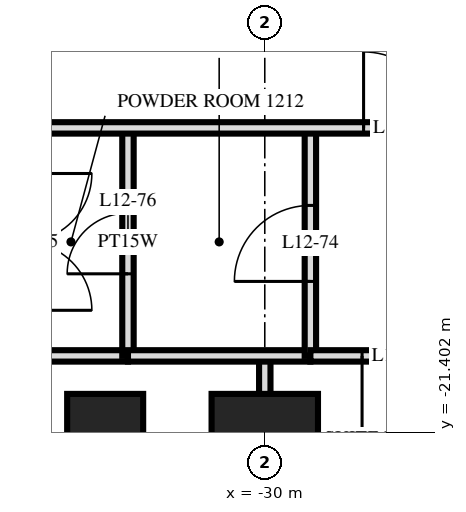
"""IFC4 building model, lengths in metres.
Left out: names, types, materials, properties, quantities, classifications, styles, units other than length and angle.
Written with IfcOpenShell. Run it as: python <this file> out.ifc"""

import sys

from ifc_helpers import new_model, si_unit, direction, frame, frame_2d, origin, origin_2d, place, context, subcontext, project, spatial, rectangle, extrude, element, fill, save


model = new_model("IFC4")
c1 = context("Model", 3, precision=1e-05, world=origin(), true_north=direction((0.0, 1.0)))
c2 = subcontext(c1, "Body", "Model", "MODEL_VIEW")
j1 = project(units=[si_unit("LENGTHUNIT", "METRE"), si_unit("PLANEANGLEUNIT", "RADIAN")], contexts=[c1])
p1 = place(None, origin())
s1 = spatial("IfcSite", under=j1, at=p1, CompositionType="ELEMENT")
p2 = place(p1, origin())
s2 = spatial("IfcBuilding", under=s1, at=p2, CompositionType="ELEMENT")
p3 = place(p2, frame((0.0, 0.0, 52.8)))
s3 = spatial("IfcBuildingStorey", under=s2, at=p3, CompositionType="ELEMENT", Elevation=52.8)
p4 = place(p3, frame((-32.1, -21.6, 0.0), z_axis=(0.0, 0.0, 1.0), x_axis=(0.0, 1.0, 0.0)))
e1 = element("IfcColumn", 1, at=p4, inside=s3, PredefinedType="COLUMN", context=c2, shape_type="SweptSolid", body=[
    extrude(rectangle(XDim=1.4, YDim=1.0, at=origin_2d()), origin(), (0.0, 0.0, 1.0), 3.6),
])
p5 = place(p3, frame((-30.0, -21.6, 0.0), z_axis=(0.0, 0.0, 1.0), x_axis=(1.0, 0.0, 0.0)))
e2 = element("IfcColumn", 2, at=p5, inside=s3, PredefinedType="COLUMN", context=c2, shape_type="SweptSolid", body=[
    extrude(rectangle(XDim=1.4, YDim=1.4, at=origin_2d()), origin(), (0.0, 0.0, 1.0), 3.6),
])
p6 = place(p3, frame((-29.4, -20.4, 0.0), z_axis=(0.0, 0.0, 1.0), x_axis=(0.0, 1.0, 0.0)))
e3 = element("IfcWall", 3, at=p6, inside=s3, PredefinedType="PARTITIONING", context=c2, shape_type="SweptSolid", body=[
    extrude(rectangle(XDim=3.0, YDim=0.15, at=frame_2d((1.5, 0.0))), origin(), (0.0, 0.0, 1.0), 3.32),
])
p7 = place(p6, frame((0.98, 0.0, 0.0)))
e4 = element("IfcOpeningElement", 4, at=p7, cuts=e3, PredefinedType="OPENING", context=c2, shape_type="SweptSolid", body=[
    extrude(rectangle(XDim=1.0, YDim=2.1, at=frame_2d((0.5, 1.05))), frame((0.0, 0.085, 0.0), z_axis=(0.0, -1.0, 0.0), x_axis=(1.0, 0.0, 0.0)), (0.0, 0.0, 1.0), 0.17),
])
p8 = place(p3, frame((-30.0, -28.978, 0.0), z_axis=(0.0, 0.0, 1.0), x_axis=(0.0, 1.0, 0.0)))
e5 = element("IfcWall", 5, at=p8, inside=s3, PredefinedType="PARTITIONING", context=c2, shape_type="SweptSolid", body=[
    extrude(rectangle(XDim=8.578, YDim=0.15, at=frame_2d((4.289, 0.0))), origin(), (0.0, 0.0, 1.0), 3.32),
])
p9 = place(p8, frame((3.737, 0.0, 0.0)))
e6 = element("IfcOpeningElement", 6, at=p9, cuts=e5, PredefinedType="OPENING", context=c2, shape_type="SweptSolid", body=[
    extrude(rectangle(XDim=0.9, YDim=2.1, at=frame_2d((0.45, 1.05))), frame((0.0, 0.085, 0.0), z_axis=(0.0, -1.0, 0.0), x_axis=(1.0, 0.0, 0.0)), (0.0, 0.0, 1.0), 0.17),
])
p10 = place(p3, frame((-31.8, -20.4, 0.0), z_axis=(0.0, 0.0, 1.0), x_axis=(0.0, 1.0, 0.0)))
e7 = element("IfcWall", 7, at=p10, inside=s3, PredefinedType="PLUMBINGWALL", context=c2, shape_type="SweptSolid", body=[
    extrude(rectangle(XDim=3.0, YDim=0.15, at=frame_2d((1.5, 0.0))), origin(), (0.0, 0.0, 1.0), 3.32),
])
p11 = place(p10, frame((1.08, 0.0, 0.0)))
e8 = element("IfcOpeningElement", 8, at=p11, cuts=e7, PredefinedType="OPENING", context=c2, shape_type="SweptSolid", body=[
    extrude(rectangle(XDim=0.8, YDim=2.1, at=frame_2d((0.4, 1.05))), frame((0.0, 0.085, 0.0), z_axis=(0.0, -1.0, 0.0), x_axis=(1.0, 0.0, 0.0)), (0.0, 0.0, 1.0), 0.17),
])
p12 = place(p3, frame((-29.4, -20.4, 0.0), z_axis=(0.0, 0.0, 1.0), x_axis=(1.0, 0.0, 0.0)))
e9 = element("IfcWall", 9, at=p12, inside=s3, PredefinedType="PARTITIONING", context=c2, shape_type="SweptSolid", body=[
    extrude(rectangle(XDim=2.4, YDim=0.15, at=frame_2d((1.2, 0.0))), origin(), (0.0, 0.0, 1.0), 3.32),
])
p13 = place(p12, frame((0.68, 0.0, 0.0)))
e10 = element("IfcOpeningElement", 10, at=p13, cuts=e9, PredefinedType="OPENING", context=c2, shape_type="SweptSolid", body=[
    extrude(rectangle(XDim=1.0, YDim=2.1, at=frame_2d((0.5, 1.05))), frame((0.0, 0.085, 0.0), z_axis=(0.0, -1.0, 0.0), x_axis=(1.0, 0.0, 0.0)), (0.0, 0.0, 1.0), 0.17),
])
p14 = place(p3, frame((-31.8, -20.4, 0.0), z_axis=(0.0, 0.0, 1.0), x_axis=(1.0, 0.0, 0.0)))
e11 = element("IfcWall", 11, at=p14, inside=s3, PredefinedType="PARTITIONING", context=c2, shape_type="SweptSolid", body=[
    extrude(rectangle(XDim=2.4, YDim=0.15, at=frame_2d((1.2, 0.0))), origin(), (0.0, 0.0, 1.0), 3.32),
])
p15 = place(p3, frame((-33.12, -20.4, 0.0), z_axis=(0.0, 0.0, 1.0), x_axis=(1.0, 0.0, 0.0)))
e12 = element("IfcWall", 12, at=p15, inside=s3, PredefinedType="PLUMBINGWALL", context=c2, shape_type="SweptSolid", body=[
    extrude(rectangle(XDim=1.32, YDim=0.15, at=frame_2d((0.66, 0.0))), origin(), (0.0, 0.0, 1.0), 3.32),
])
p16 = place(p3, frame((-33.12, -17.4, 0.0), z_axis=(0.0, 0.0, 1.0), x_axis=(1.0, 0.0, 0.0)))
e13 = element("IfcWall", 13, at=p16, inside=s3, PredefinedType="PARTITIONING", context=c2, shape_type="SweptSolid", body=[
    extrude(rectangle(XDim=66.24, YDim=0.15, at=frame_2d((33.12, 0.0))), origin(), (0.0, 0.0, 1.0), 3.32),
])
p17 = place(p16, frame((9.27, 0.0, 0.0)))
e14 = element("IfcOpeningElement", 14, at=p17, cuts=e13, PredefinedType="OPENING", context=c2, shape_type="SweptSolid", body=[
    extrude(rectangle(XDim=1.0, YDim=2.1, at=frame_2d((0.5, 1.05))), frame((0.0, 0.085, 0.0), z_axis=(0.0, -1.0, 0.0), x_axis=(1.0, 0.0, 0.0)), (0.0, 0.0, 1.0), 0.17),
])
p18 = place(p16, frame((13.97, 0.0, 0.0)))
e15 = element("IfcOpeningElement", 15, at=p18, cuts=e13, PredefinedType="OPENING", context=c2, shape_type="SweptSolid", body=[
    extrude(rectangle(XDim=1.0, YDim=2.1, at=frame_2d((0.5, 1.05))), frame((0.0, 0.085, 0.0), z_axis=(0.0, -1.0, 0.0), x_axis=(1.0, 0.0, 0.0)), (0.0, 0.0, 1.0), 0.17),
])
p19 = place(p16, frame((15.27, 0.0, 0.0)))
e16 = element("IfcOpeningElement", 16, at=p19, cuts=e13, PredefinedType="OPENING", context=c2, shape_type="SweptSolid", body=[
    extrude(rectangle(XDim=1.0, YDim=2.1, at=frame_2d((0.5, 1.05))), frame((0.0, 0.085, 0.0), z_axis=(0.0, -1.0, 0.0), x_axis=(1.0, 0.0, 0.0)), (0.0, 0.0, 1.0), 0.17),
])
p20 = place(p16, frame((19.97, 0.0, 0.0)))
e17 = element("IfcOpeningElement", 17, at=p20, cuts=e13, PredefinedType="OPENING", context=c2, shape_type="SweptSolid", body=[
    extrude(rectangle(XDim=1.0, YDim=2.1, at=frame_2d((0.5, 1.05))), frame((0.0, 0.085, 0.0), z_axis=(0.0, -1.0, 0.0), x_axis=(1.0, 0.0, 0.0)), (0.0, 0.0, 1.0), 0.17),
])
p21 = place(p16, frame((22.27, 0.0, 0.0)))
e18 = element("IfcOpeningElement", 18, at=p21, cuts=e13, PredefinedType="OPENING", context=c2, shape_type="SweptSolid", body=[
    extrude(rectangle(XDim=1.0, YDim=2.1, at=frame_2d((0.5, 1.05))), frame((0.0, 0.085, 0.0), z_axis=(0.0, -1.0, 0.0), x_axis=(1.0, 0.0, 0.0)), (0.0, 0.0, 1.0), 0.17),
])
p22 = place(p16, frame((28.97, 0.0, 0.0)))
e19 = element("IfcOpeningElement", 19, at=p22, cuts=e13, PredefinedType="OPENING", context=c2, shape_type="SweptSolid", body=[
    extrude(rectangle(XDim=1.0, YDim=2.1, at=frame_2d((0.5, 1.05))), frame((0.0, 0.085, 0.0), z_axis=(0.0, -1.0, 0.0), x_axis=(1.0, 0.0, 0.0)), (0.0, 0.0, 1.0), 0.17),
])
p23 = place(p16, frame((30.27, 0.0, 0.0)))
e20 = element("IfcOpeningElement", 20, at=p23, cuts=e13, PredefinedType="OPENING", context=c2, shape_type="SweptSolid", body=[
    extrude(rectangle(XDim=1.0, YDim=2.1, at=frame_2d((0.5, 1.05))), frame((0.0, 0.085, 0.0), z_axis=(0.0, -1.0, 0.0), x_axis=(1.0, 0.0, 0.0)), (0.0, 0.0, 1.0), 0.17),
])
p24 = place(p16, frame((34.97, 0.0, 0.0)))
e21 = element("IfcOpeningElement", 21, at=p24, cuts=e13, PredefinedType="OPENING", context=c2, shape_type="SweptSolid", body=[
    extrude(rectangle(XDim=1.0, YDim=2.1, at=frame_2d((0.5, 1.05))), frame((0.0, 0.085, 0.0), z_axis=(0.0, -1.0, 0.0), x_axis=(1.0, 0.0, 0.0)), (0.0, 0.0, 1.0), 0.17),
])
p25 = place(p16, frame((36.27, 0.0, 0.0)))
e22 = element("IfcOpeningElement", 22, at=p25, cuts=e13, PredefinedType="OPENING", context=c2, shape_type="SweptSolid", body=[
    extrude(rectangle(XDim=1.0, YDim=2.1, at=frame_2d((0.5, 1.05))), frame((0.0, 0.085, 0.0), z_axis=(0.0, -1.0, 0.0), x_axis=(1.0, 0.0, 0.0)), (0.0, 0.0, 1.0), 0.17),
])
p26 = place(p16, frame((39.82, 0.0, 0.0)))
e23 = element("IfcOpeningElement", 23, at=p26, cuts=e13, PredefinedType="OPENING", context=c2, shape_type="SweptSolid", body=[
    extrude(rectangle(XDim=1.0, YDim=2.1, at=frame_2d((0.5, 1.05))), frame((0.0, 0.085, 0.0), z_axis=(0.0, -1.0, 0.0), x_axis=(1.0, 0.0, 0.0)), (0.0, 0.0, 1.0), 0.17),
])
p27 = place(p16, frame((51.27, 0.0, 0.0)))
e24 = element("IfcOpeningElement", 24, at=p27, cuts=e13, PredefinedType="OPENING", context=c2, shape_type="SweptSolid", body=[
    extrude(rectangle(XDim=1.0, YDim=2.1, at=frame_2d((0.5, 1.05))), frame((0.0, 0.085, 0.0), z_axis=(0.0, -1.0, 0.0), x_axis=(1.0, 0.0, 0.0)), (0.0, 0.0, 1.0), 0.17),
])
p28 = place(p16, frame((4.42, 0.0, 0.0)))
e25 = element("IfcOpeningElement", 25, at=p28, cuts=e13, PredefinedType="OPENING", context=c2, shape_type="SweptSolid", body=[
    extrude(rectangle(XDim=1.0, YDim=2.1, at=frame_2d((0.5, 1.05))), frame((0.0, 0.085, 0.0), z_axis=(0.0, -1.0, 0.0), x_axis=(1.0, 0.0, 0.0)), (0.0, 0.0, 1.0), 0.17),
])
p29 = place(p16, frame((54.82, 0.0, 0.0)))
e26 = element("IfcOpeningElement", 26, at=p29, cuts=e13, PredefinedType="OPENING", context=c2, shape_type="SweptSolid", body=[
    extrude(rectangle(XDim=1.0, YDim=2.1, at=frame_2d((0.5, 1.05))), frame((0.0, 0.085, 0.0), z_axis=(0.0, -1.0, 0.0), x_axis=(1.0, 0.0, 0.0)), (0.0, 0.0, 1.0), 0.17),
])
p30 = place(p28, origin())
e27 = element("IfcDoor", 27, at=p30, inside=s3, OperationType="SINGLE_SWING_RIGHT", PredefinedType="DOOR", context=c2, shape_type="SweptSolid", body=[
    extrude(rectangle(XDim=1.0, YDim=2.1, at=frame_2d((0.5, 1.05))), frame((0.0, 0.025, 0.0), z_axis=(0.0, -1.0, 0.0), x_axis=(1.0, 0.0, 0.0)), (0.0, 0.0, 1.0), 0.05),
])
fill(e25, e27)
p31 = place(p7, origin())
e28 = element("IfcDoor", 28, at=p31, inside=s3, OperationType="SINGLE_SWING_RIGHT", PredefinedType="DOOR", context=c2, shape_type="SweptSolid", body=[
    extrude(rectangle(XDim=1.0, YDim=2.1, at=frame_2d((0.5, 1.05))), frame((0.0, 0.025, 0.0), z_axis=(0.0, -1.0, 0.0), x_axis=(1.0, 0.0, 0.0)), (0.0, 0.0, 1.0), 0.05),
])
fill(e4, e28)
p32 = place(p13, frame((0.5, 0.0, 0.0), z_axis=(0.0, 0.0, 1.0), x_axis=(-1.0, 0.0, 0.0)))
e29 = element("IfcDoor", 29, at=p32, inside=s3, OperationType="SINGLE_SWING_LEFT", PredefinedType="DOOR", context=c2, shape_type="SweptSolid", body=[
    extrude(rectangle(XDim=1.0, YDim=2.1, at=frame_2d((0.0, 1.05))), frame((0.0, -0.025, 0.0), z_axis=(0.0, 1.0, 0.0), x_axis=(-1.0, 0.0, 0.0)), (0.0, 0.0, 1.0), 0.05),
])
fill(e10, e29)
p33 = place(p11, origin())
e30 = element("IfcDoor", 30, at=p33, inside=s3, OperationType="SINGLE_SWING_RIGHT", PredefinedType="DOOR", context=c2, shape_type="SweptSolid", body=[
    extrude(rectangle(XDim=0.8, YDim=2.1, at=frame_2d((0.4, 1.05))), frame((0.0, 0.025, 0.0), z_axis=(0.0, -1.0, 0.0), x_axis=(1.0, 0.0, 0.0)), (0.0, 0.0, 1.0), 0.05),
])
fill(e8, e30)
save(model, sys.argv[1])
